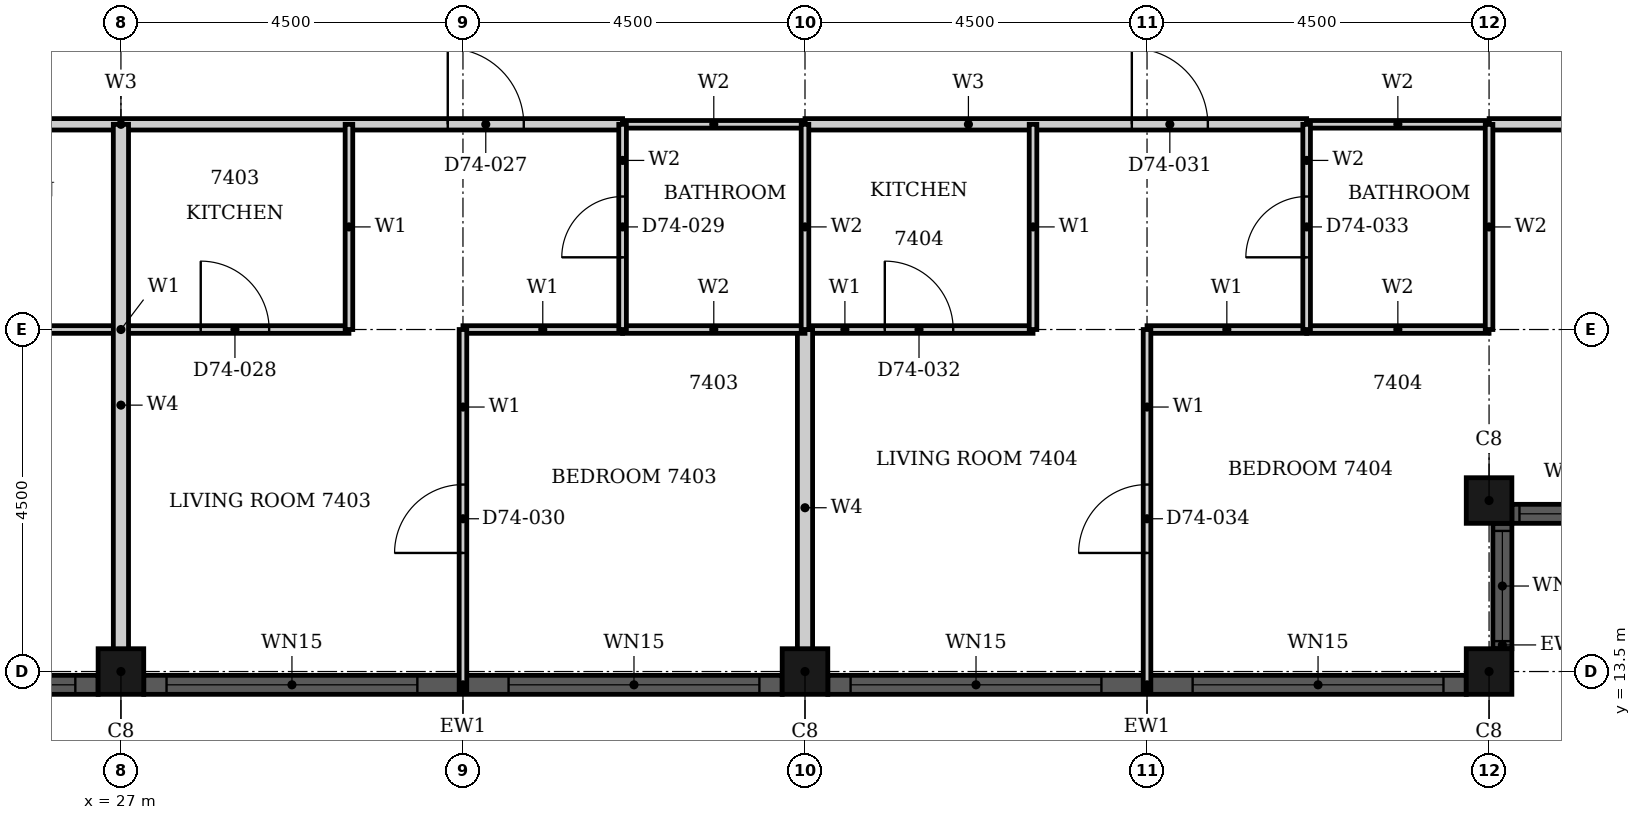
"""IFC4 building model, lengths in metres.
Left out: names, types, materials, properties, quantities, classifications, styles, units other than length and angle.
Written with IfcOpenShell. Run it as: python <this file> out.ifc"""

import sys

from ifc_helpers import new_model, si_unit, direction, frame, frame_2d, origin, origin_2d, place, context, subcontext, project, spatial, rectangle, hollow_rectangle, extrude, element, fill, save


model = new_model("IFC4")
c1 = context("Model", 3, precision=1e-05, world=origin(), true_north=direction((0.0, 1.0)))
c2 = subcontext(c1, "Body", "Model", "MODEL_VIEW")
j1 = project(units=[si_unit("LENGTHUNIT", "METRE"), si_unit("PLANEANGLEUNIT", "RADIAN")], contexts=[c1])
p1 = place(None, origin())
s1 = spatial("IfcSite", under=j1, at=p1, CompositionType="ELEMENT")
p2 = place(p1, origin())
s2 = spatial("IfcBuilding", under=s1, at=p2, CompositionType="ELEMENT")
p3 = place(p2, frame((0.0, 0.0, 290.8)))
s3 = spatial("IfcBuildingStorey", under=s2, at=p3, CompositionType="ELEMENT", Elevation=290.8)
for number, where, z_axis, x_axis in (
    (1, (45.0, 13.5, 0.0), (0.0, 0.0, 1.0), (1.0, 0.0, 0.0)),
    (2, (45.0, 15.75, 0.0), (0.0, 0.0, 1.0), (1.0, 0.0, 0.0)),
    (3, (27.0, 13.5, 0.0), (0.0, 0.0, 1.0), (1.0, 0.0, 0.0)),
    (4, (36.0, 13.5, 0.0), (0.0, 0.0, 1.0), (1.0, 0.0, 0.0)),
):
    element("IfcColumn", number, at=place(p3, frame(where, z_axis=z_axis, x_axis=x_axis)), inside=s3, PredefinedType="COLUMN", context=c2, shape_type="SweptSolid", body=[
        extrude(hollow_rectangle(XDim=0.6, YDim=0.6, WallThickness=0.02, at=origin_2d()), origin(), (0.0, 0.0, 1.0), 3.7),
    ])
p4 = place(p3, frame((45.175, 13.8, 0.0), z_axis=(0.0, 0.0, 1.0), x_axis=(0.0, 1.0, 0.0)))
e5 = element("IfcWall", 5, at=p4, inside=s3, PredefinedType="SOLIDWALL", context=c2, shape_type="SweptSolid", body=[
    extrude(rectangle(XDim=1.65, YDim=0.25, at=frame_2d((0.825, 0.0))), origin(), (0.0, 0.0, 1.0), 3.7),
])
p5 = place(p4, frame((0.1, 0.0, 0.9)))
e6 = element("IfcOpeningElement", 6, at=p5, cuts=e5, PredefinedType="OPENING", context=c2, shape_type="SweptSolid", body=[
    extrude(rectangle(XDim=1.45, YDim=1.85, at=frame_2d((0.725, 0.925))), frame((0.0, 0.135, 0.0), z_axis=(0.0, -1.0, 0.0), x_axis=(1.0, 0.0, 0.0)), (0.0, 0.0, 1.0), 0.27),
])
p6 = place(p3, frame((45.3, 15.575, 0.0), z_axis=(0.0, 0.0, 1.0), x_axis=(1.0, 0.0, 0.0)))
e7 = element("IfcWall", 7, at=p6, inside=s3, PredefinedType="SOLIDWALL", context=c2, shape_type="SweptSolid", body=[
    extrude(rectangle(XDim=1.65, YDim=0.25, at=frame_2d((0.825, 0.0))), origin(), (0.0, 0.0, 1.0), 3.7),
])
p7 = place(p6, frame((0.1, 0.0, 0.9)))
e8 = element("IfcOpeningElement", 8, at=p7, cuts=e7, PredefinedType="OPENING", context=c2, shape_type="SweptSolid", body=[
    extrude(rectangle(XDim=1.45, YDim=1.85, at=frame_2d((0.725, 0.925))), frame((0.0, 0.135, 0.0), z_axis=(0.0, -1.0, 0.0), x_axis=(1.0, 0.0, 0.0)), (0.0, 0.0, 1.0), 0.27),
])
p8 = place(p3, frame((18.3, 13.325, 0.0), z_axis=(0.0, 0.0, 1.0), x_axis=(1.0, 0.0, 0.0)))
e9 = element("IfcWall", 9, at=p8, inside=s3, PredefinedType="SOLIDWALL", context=c2, shape_type="SweptSolid", body=[
    extrude(rectangle(XDim=8.4, YDim=0.25, at=frame_2d((4.2, 0.0))), origin(), (0.0, 0.0, 1.0), 3.7),
])
p9 = place(p8, frame((0.3, 0.0, 0.45)))
e10 = element("IfcOpeningElement", 10, at=p9, cuts=e9, PredefinedType="OPENING", context=c2, shape_type="SweptSolid", body=[
    extrude(rectangle(XDim=3.3, YDim=2.3, at=frame_2d((1.65, 1.15))), frame((0.0, 0.135, 0.0), z_axis=(0.0, -1.0, 0.0), x_axis=(1.0, 0.0, 0.0)), (0.0, 0.0, 1.0), 0.27),
])
p10 = place(p8, frame((4.8, 0.0, 0.45)))
e11 = element("IfcOpeningElement", 11, at=p10, cuts=e9, PredefinedType="OPENING", context=c2, shape_type="SweptSolid", body=[
    extrude(rectangle(XDim=3.3, YDim=2.3, at=frame_2d((1.65, 1.15))), frame((0.0, 0.135, 0.0), z_axis=(0.0, -1.0, 0.0), x_axis=(1.0, 0.0, 0.0)), (0.0, 0.0, 1.0), 0.27),
])
p11 = place(p3, frame((27.3, 13.325, 0.0), z_axis=(0.0, 0.0, 1.0), x_axis=(1.0, 0.0, 0.0)))
e12 = element("IfcWall", 12, at=p11, inside=s3, PredefinedType="SOLIDWALL", context=c2, shape_type="SweptSolid", body=[
    extrude(rectangle(XDim=8.4, YDim=0.25, at=frame_2d((4.2, 0.0))), origin(), (0.0, 0.0, 1.0), 3.7),
])
p12 = place(p11, frame((0.3, 0.0, 0.45)))
e13 = element("IfcOpeningElement", 13, at=p12, cuts=e12, PredefinedType="OPENING", context=c2, shape_type="SweptSolid", body=[
    extrude(rectangle(XDim=3.3, YDim=2.3, at=frame_2d((1.65, 1.15))), frame((0.0, 0.135, 0.0), z_axis=(0.0, -1.0, 0.0), x_axis=(1.0, 0.0, 0.0)), (0.0, 0.0, 1.0), 0.27),
])
p13 = place(p11, frame((4.8, 0.0, 0.45)))
e14 = element("IfcOpeningElement", 14, at=p13, cuts=e12, PredefinedType="OPENING", context=c2, shape_type="SweptSolid", body=[
    extrude(rectangle(XDim=3.3, YDim=2.3, at=frame_2d((1.65, 1.15))), frame((0.0, 0.135, 0.0), z_axis=(0.0, -1.0, 0.0), x_axis=(1.0, 0.0, 0.0)), (0.0, 0.0, 1.0), 0.27),
])
p14 = place(p3, frame((36.3, 13.325, 0.0), z_axis=(0.0, 0.0, 1.0), x_axis=(1.0, 0.0, 0.0)))
e15 = element("IfcWall", 15, at=p14, inside=s3, PredefinedType="SOLIDWALL", context=c2, shape_type="SweptSolid", body=[
    extrude(rectangle(XDim=8.4, YDim=0.25, at=frame_2d((4.2, 0.0))), origin(), (0.0, 0.0, 1.0), 3.7),
])
p15 = place(p14, frame((0.3, 0.0, 0.45)))
e16 = element("IfcOpeningElement", 16, at=p15, cuts=e15, PredefinedType="OPENING", context=c2, shape_type="SweptSolid", body=[
    extrude(rectangle(XDim=3.3, YDim=2.3, at=frame_2d((1.65, 1.15))), frame((0.0, 0.135, 0.0), z_axis=(0.0, -1.0, 0.0), x_axis=(1.0, 0.0, 0.0)), (0.0, 0.0, 1.0), 0.27),
])
p16 = place(p14, frame((4.8, 0.0, 0.45)))
e17 = element("IfcOpeningElement", 17, at=p16, cuts=e15, PredefinedType="OPENING", context=c2, shape_type="SweptSolid", body=[
    extrude(rectangle(XDim=3.3, YDim=2.3, at=frame_2d((1.65, 1.15))), frame((0.0, 0.135, 0.0), z_axis=(0.0, -1.0, 0.0), x_axis=(1.0, 0.0, 0.0)), (0.0, 0.0, 1.0), 0.27),
])
p17 = place(p3, frame((20.4, 20.7, 0.0), z_axis=(0.0, 0.0, 1.0), x_axis=(1.0, 0.0, 0.0)))
e18 = element("IfcWall", 18, at=p17, inside=s3, PredefinedType="PARTITIONING", context=c2, shape_type="SweptSolid", body=[
    extrude(rectangle(XDim=13.2, YDim=0.15, at=frame_2d((6.6, 0.0))), origin(), (0.0, 0.0, 1.0), 3.4),
])
p18 = place(p17, frame((1.3, 0.0, 0.0)))
e19 = element("IfcOpeningElement", 19, at=p18, cuts=e18, PredefinedType="OPENING", context=c2, shape_type="SweptSolid", body=[
    extrude(rectangle(XDim=1.0, YDim=2.2, at=frame_2d((0.5, 1.1))), frame((0.0, 0.085, 0.0), z_axis=(0.0, -1.0, 0.0), x_axis=(1.0, 0.0, 0.0)), (0.0, 0.0, 1.0), 0.17),
])
p19 = place(p17, frame((10.9, 0.0, 0.0)))
e20 = element("IfcOpeningElement", 20, at=p19, cuts=e18, PredefinedType="OPENING", context=c2, shape_type="SweptSolid", body=[
    extrude(rectangle(XDim=1.0, YDim=2.2, at=frame_2d((0.5, 1.1))), frame((0.0, 0.085, 0.0), z_axis=(0.0, -1.0, 0.0), x_axis=(1.0, 0.0, 0.0)), (0.0, 0.0, 1.0), 0.17),
])
p20 = place(p3, frame((45.001, 20.7, 0.0), z_axis=(0.0, 0.0, 1.0), x_axis=(1.0, 0.0, 0.0)))
e21 = element("IfcWall", 21, at=p20, inside=s3, PredefinedType="PARTITIONING", context=c2, shape_type="SweptSolid", body=[
    extrude(rectangle(XDim=4.549, YDim=0.15, at=frame_2d((2.274, 0.0))), origin(), (0.0, 0.0, 1.0), 3.4),
])
p21 = place(p3, frame((36.0, 20.7, 0.0), z_axis=(0.0, 0.0, 1.0), x_axis=(1.0, 0.0, 0.0)))
e22 = element("IfcWall", 22, at=p21, inside=s3, PredefinedType="PARTITIONING", context=c2, shape_type="SweptSolid", body=[
    extrude(rectangle(XDim=6.6, YDim=0.15, at=frame_2d((3.3, 0.0))), origin(), (0.0, 0.0, 1.0), 3.4),
])
p22 = place(p21, frame((4.3, 0.0, 0.0)))
e23 = element("IfcOpeningElement", 23, at=p22, cuts=e22, PredefinedType="OPENING", context=c2, shape_type="SweptSolid", body=[
    extrude(rectangle(XDim=1.0, YDim=2.2, at=frame_2d((0.5, 1.1))), frame((0.0, 0.085, 0.0), z_axis=(0.0, -1.0, 0.0), x_axis=(1.0, 0.0, 0.0)), (0.0, 0.0, 1.0), 0.17),
])
p23 = place(p3, frame((24.0, 18.0, 0.0), z_axis=(0.0, 0.0, 1.0), x_axis=(1.0, 0.0, 0.0)))
e24 = element("IfcWall", 24, at=p23, inside=s3, PredefinedType="PARTITIONING", context=c2, shape_type="SweptSolid", body=[
    extrude(rectangle(XDim=6.0, YDim=0.1, at=frame_2d((3.0, 0.0))), origin(), (0.0, 0.0, 1.0), 3.4),
])
p24 = place(p23, frame((1.05, 0.0, 0.0)))
e25 = element("IfcOpeningElement", 25, at=p24, cuts=e24, PredefinedType="OPENING", context=c2, shape_type="SweptSolid", body=[
    extrude(rectangle(XDim=0.9, YDim=2.1, at=frame_2d((0.45, 1.05))), frame((0.0, 0.06, 0.0), z_axis=(0.0, -1.0, 0.0), x_axis=(1.0, 0.0, 0.0)), (0.0, 0.0, 1.0), 0.12),
])
p25 = place(p23, frame((4.05, 0.0, 0.0)))
e26 = element("IfcOpeningElement", 26, at=p25, cuts=e24, PredefinedType="OPENING", context=c2, shape_type="SweptSolid", body=[
    extrude(rectangle(XDim=0.9, YDim=2.1, at=frame_2d((0.45, 1.05))), frame((0.0, 0.06, 0.0), z_axis=(0.0, -1.0, 0.0), x_axis=(1.0, 0.0, 0.0)), (0.0, 0.0, 1.0), 0.12),
])
for number, where, z_axis, x_axis in (
    (27, (31.5, 18.0, 0.0), (0.0, 0.0, 1.0), (1.0, 0.0, 0.0)),
    (28, (40.5, 18.0, 0.0), (0.0, 0.0, 1.0), (1.0, 0.0, 0.0)),
):
    element("IfcWall", number, at=place(p3, frame(where, z_axis=z_axis, x_axis=x_axis)), inside=s3, PredefinedType="PARTITIONING", context=c2, shape_type="SweptSolid", body=[
        extrude(rectangle(XDim=2.1, YDim=0.1, at=frame_2d((1.05, 0.0))), origin(), (0.0, 0.0, 1.0), 3.4),
    ])
p26 = place(p3, frame((36.0, 18.0, 0.0), z_axis=(0.0, 0.0, 1.0), x_axis=(1.0, 0.0, 0.0)))
e29 = element("IfcWall", 29, at=p26, inside=s3, PredefinedType="PARTITIONING", context=c2, shape_type="SweptSolid", body=[
    extrude(rectangle(XDim=3.0, YDim=0.1, at=frame_2d((1.5, 0.0))), origin(), (0.0, 0.0, 1.0), 3.4),
])
p27 = place(p26, frame((1.05, 0.0, 0.0)))
e30 = element("IfcOpeningElement", 30, at=p27, cuts=e29, PredefinedType="OPENING", context=c2, shape_type="SweptSolid", body=[
    extrude(rectangle(XDim=0.9, YDim=2.1, at=frame_2d((0.45, 1.05))), frame((0.0, 0.06, 0.0), z_axis=(0.0, -1.0, 0.0), x_axis=(1.0, 0.0, 0.0)), (0.0, 0.0, 1.0), 0.12),
])
p28 = place(p3, frame((30.0, 18.0, 0.0), z_axis=(0.0, 0.0, 1.0), x_axis=(0.0, 1.0, 0.0)))
e31 = element("IfcWall", 31, at=p28, inside=s3, PredefinedType="PARTITIONING", context=c2, shape_type="SweptSolid", body=[
    extrude(rectangle(XDim=2.7, YDim=0.1, at=frame_2d((1.35, 0.0))), origin(), (0.0, 0.0, 1.0), 3.4),
])
p29 = place(p3, frame((31.5, 13.26, 0.0), z_axis=(0.0, 0.0, 1.0), x_axis=(0.0, 1.0, 0.0)))
e32 = element("IfcWall", 32, at=p29, inside=s3, PredefinedType="PARTITIONING", context=c2, shape_type="SweptSolid", body=[
    extrude(rectangle(XDim=4.74, YDim=0.1, at=frame_2d((2.37, 0.0))), origin(), (0.0, 0.0, 1.0), 3.4),
])
p30 = place(p29, frame((1.8, 0.0, 0.0)))
e33 = element("IfcOpeningElement", 33, at=p30, cuts=e32, PredefinedType="OPENING", context=c2, shape_type="SweptSolid", body=[
    extrude(rectangle(XDim=0.9, YDim=2.1, at=frame_2d((0.45, 1.05))), frame((0.0, 0.06, 0.0), z_axis=(0.0, -1.0, 0.0), x_axis=(1.0, 0.0, 0.0)), (0.0, 0.0, 1.0), 0.12),
])
p31 = place(p3, frame((39.0, 18.0, 0.0), z_axis=(0.0, 0.0, 1.0), x_axis=(0.0, 1.0, 0.0)))
e34 = element("IfcWall", 34, at=p31, inside=s3, PredefinedType="PARTITIONING", context=c2, shape_type="SweptSolid", body=[
    extrude(rectangle(XDim=2.7, YDim=0.1, at=frame_2d((1.35, 0.0))), origin(), (0.0, 0.0, 1.0), 3.4),
])
p32 = place(p3, frame((40.5, 13.26, 0.0), z_axis=(0.0, 0.0, 1.0), x_axis=(0.0, 1.0, 0.0)))
e35 = element("IfcWall", 35, at=p32, inside=s3, PredefinedType="PARTITIONING", context=c2, shape_type="SweptSolid", body=[
    extrude(rectangle(XDim=4.74, YDim=0.1, at=frame_2d((2.37, 0.0))), origin(), (0.0, 0.0, 1.0), 3.4),
])
p33 = place(p32, frame((1.8, 0.0, 0.0)))
e36 = element("IfcOpeningElement", 36, at=p33, cuts=e35, PredefinedType="OPENING", context=c2, shape_type="SweptSolid", body=[
    extrude(rectangle(XDim=0.9, YDim=2.1, at=frame_2d((0.45, 1.05))), frame((0.0, 0.06, 0.0), z_axis=(0.0, -1.0, 0.0), x_axis=(1.0, 0.0, 0.0)), (0.0, 0.0, 1.0), 0.12),
])
p34 = place(p3, frame((27.0, 13.31, 0.0), z_axis=(0.0, 0.0, 1.0), x_axis=(0.0, 1.0, 0.0)))
e37 = element("IfcWall", 37, at=p34, inside=s3, PredefinedType="PARTITIONING", context=c2, shape_type="SweptSolid", body=[
    extrude(rectangle(XDim=7.39, YDim=0.2, at=frame_2d((3.695, 0.0))), origin(), (0.0, 0.0, 1.0), 3.4),
])
p35 = place(p3, frame((36.0, 13.31, 0.0), z_axis=(0.0, 0.0, 1.0), x_axis=(0.0, 1.0, 0.0)))
e38 = element("IfcWall", 38, at=p35, inside=s3, PredefinedType="PARTITIONING", context=c2, shape_type="SweptSolid", body=[
    extrude(rectangle(XDim=4.69, YDim=0.2, at=frame_2d((2.345, 0.0))), origin(), (0.0, 0.0, 1.0), 3.4),
])
for number, where, z_axis, x_axis in (
    (39, (33.6, 18.0, 0.0), (0.0, 0.0, 1.0), (1.0, 0.0, 0.0)),
    (40, (42.6, 18.0, 0.0), (0.0, 0.0, 1.0), (1.0, 0.0, 0.0)),
    (41, (33.6, 20.7, 0.0), (0.0, 0.0, 1.0), (1.0, 0.0, 0.0)),
    (42, (42.6, 20.7, 0.0), (0.0, 0.0, 1.0), (1.0, 0.0, 0.0)),
):
    element("IfcWall", number, at=place(p3, frame(where, z_axis=z_axis, x_axis=x_axis)), inside=s3, PredefinedType="PARTITIONING", context=c2, shape_type="SweptSolid", body=[
        extrude(rectangle(XDim=2.4, YDim=0.1, at=frame_2d((1.2, 0.0))), origin(), (0.0, 0.0, 1.0), 3.4),
    ])
p36 = place(p3, frame((33.6, 18.0, 0.0), z_axis=(0.0, 0.0, 1.0), x_axis=(0.0, 1.0, 0.0)))
e43 = element("IfcWall", 43, at=p36, inside=s3, PredefinedType="PARTITIONING", context=c2, shape_type="SweptSolid", body=[
    extrude(rectangle(XDim=2.7, YDim=0.1, at=frame_2d((1.35, 0.0))), origin(), (0.0, 0.0, 1.0), 3.4),
])
p37 = place(p36, frame((0.95, 0.0, 0.0)))
e44 = element("IfcOpeningElement", 44, at=p37, cuts=e43, PredefinedType="OPENING", context=c2, shape_type="SweptSolid", body=[
    extrude(rectangle(XDim=0.8, YDim=2.1, at=frame_2d((0.4, 1.05))), frame((0.0, 0.06, 0.0), z_axis=(0.0, -1.0, 0.0), x_axis=(1.0, 0.0, 0.0)), (0.0, 0.0, 1.0), 0.12),
])
p38 = place(p3, frame((36.0, 18.0, 0.0), z_axis=(0.0, 0.0, 1.0), x_axis=(0.0, 1.0, 0.0)))
e45 = element("IfcWall", 45, at=p38, inside=s3, PredefinedType="PARTITIONING", context=c2, shape_type="SweptSolid", body=[
    extrude(rectangle(XDim=2.7, YDim=0.1, at=frame_2d((1.35, 0.0))), origin(), (0.0, 0.0, 1.0), 3.4),
])
p39 = place(p3, frame((42.6, 18.0, 0.0), z_axis=(0.0, 0.0, 1.0), x_axis=(0.0, 1.0, 0.0)))
e46 = element("IfcWall", 46, at=p39, inside=s3, PredefinedType="PARTITIONING", context=c2, shape_type="SweptSolid", body=[
    extrude(rectangle(XDim=2.7, YDim=0.1, at=frame_2d((1.35, 0.0))), origin(), (0.0, 0.0, 1.0), 3.4),
])
p40 = place(p39, frame((0.95, 0.0, 0.0)))
e47 = element("IfcOpeningElement", 47, at=p40, cuts=e46, PredefinedType="OPENING", context=c2, shape_type="SweptSolid", body=[
    extrude(rectangle(XDim=0.8, YDim=2.1, at=frame_2d((0.4, 1.05))), frame((0.0, 0.06, 0.0), z_axis=(0.0, -1.0, 0.0), x_axis=(1.0, 0.0, 0.0)), (0.0, 0.0, 1.0), 0.12),
])
p41 = place(p3, frame((45.0, 18.0, 0.0), z_axis=(0.0, 0.0, 1.0), x_axis=(0.0, 1.0, 0.0)))
e48 = element("IfcWall", 48, at=p41, inside=s3, PredefinedType="PARTITIONING", context=c2, shape_type="SweptSolid", body=[
    extrude(rectangle(XDim=2.699, YDim=0.1, at=frame_2d((1.35, 0.0))), origin(), (0.0, 0.0, 1.0), 3.4),
])
p42 = place(p5, origin())
e49 = element("IfcWindow", 49, at=p42, inside=s3, PartitioningType="SINGLE_PANEL", PredefinedType="WINDOW", context=c2, shape_type="SweptSolid", body=[
    extrude(rectangle(XDim=1.45, YDim=1.85, at=frame_2d((0.725, 0.925))), frame((0.0, 0.03, 0.0), z_axis=(0.0, -1.0, 0.0), x_axis=(1.0, 0.0, 0.0)), (0.0, 0.0, 1.0), 0.06),
])
fill(e6, e49)
p43 = place(p7, origin())
e50 = element("IfcWindow", 50, at=p43, inside=s3, PartitioningType="SINGLE_PANEL", PredefinedType="WINDOW", context=c2, shape_type="SweptSolid", body=[
    extrude(rectangle(XDim=1.45, YDim=1.85, at=frame_2d((0.725, 0.925))), frame((0.0, 0.03, 0.0), z_axis=(0.0, -1.0, 0.0), x_axis=(1.0, 0.0, 0.0)), (0.0, 0.0, 1.0), 0.06),
])
fill(e8, e50)
p44 = place(p10, origin())
e51 = element("IfcWindow", 51, at=p44, inside=s3, PartitioningType="SINGLE_PANEL", PredefinedType="WINDOW", context=c2, shape_type="SweptSolid", body=[
    extrude(rectangle(XDim=3.3, YDim=2.3, at=frame_2d((1.65, 1.15))), frame((0.0, 0.03, 0.0), z_axis=(0.0, -1.0, 0.0), x_axis=(1.0, 0.0, 0.0)), (0.0, 0.0, 1.0), 0.06),
])
fill(e11, e51)
p45 = place(p12, origin())
e52 = element("IfcWindow", 52, at=p45, inside=s3, PartitioningType="SINGLE_PANEL", PredefinedType="WINDOW", context=c2, shape_type="SweptSolid", body=[
    extrude(rectangle(XDim=3.3, YDim=2.3, at=frame_2d((1.65, 1.15))), frame((0.0, 0.03, 0.0), z_axis=(0.0, -1.0, 0.0), x_axis=(1.0, 0.0, 0.0)), (0.0, 0.0, 1.0), 0.06),
])
fill(e13, e52)
p46 = place(p13, origin())
e53 = element("IfcWindow", 53, at=p46, inside=s3, PartitioningType="SINGLE_PANEL", PredefinedType="WINDOW", context=c2, shape_type="SweptSolid", body=[
    extrude(rectangle(XDim=3.3, YDim=2.3, at=frame_2d((1.65, 1.15))), frame((0.0, 0.03, 0.0), z_axis=(0.0, -1.0, 0.0), x_axis=(1.0, 0.0, 0.0)), (0.0, 0.0, 1.0), 0.06),
])
fill(e14, e53)
p47 = place(p15, origin())
e54 = element("IfcWindow", 54, at=p47, inside=s3, PartitioningType="SINGLE_PANEL", PredefinedType="WINDOW", context=c2, shape_type="SweptSolid", body=[
    extrude(rectangle(XDim=3.3, YDim=2.3, at=frame_2d((1.65, 1.15))), frame((0.0, 0.03, 0.0), z_axis=(0.0, -1.0, 0.0), x_axis=(1.0, 0.0, 0.0)), (0.0, 0.0, 1.0), 0.06),
])
fill(e16, e54)
p48 = place(p16, origin())
e55 = element("IfcWindow", 55, at=p48, inside=s3, PartitioningType="SINGLE_PANEL", PredefinedType="WINDOW", context=c2, shape_type="SweptSolid", body=[
    extrude(rectangle(XDim=3.3, YDim=2.3, at=frame_2d((1.65, 1.15))), frame((0.0, 0.03, 0.0), z_axis=(0.0, -1.0, 0.0), x_axis=(1.0, 0.0, 0.0)), (0.0, 0.0, 1.0), 0.06),
])
fill(e17, e55)
p49 = place(p19, origin())
e56 = element("IfcDoor", 56, at=p49, inside=s3, OperationType="SINGLE_SWING_LEFT", PredefinedType="DOOR", context=c2, shape_type="SweptSolid", body=[
    extrude(rectangle(XDim=1.0, YDim=2.2, at=frame_2d((0.5, 1.1))), frame((0.0, 0.025, 0.0), z_axis=(0.0, -1.0, 0.0), x_axis=(1.0, 0.0, 0.0)), (0.0, 0.0, 1.0), 0.05),
])
fill(e20, e56)
p50 = place(p25, origin())
e57 = element("IfcDoor", 57, at=p50, inside=s3, OperationType="SINGLE_SWING_LEFT", PredefinedType="DOOR", context=c2, shape_type="SweptSolid", body=[
    extrude(rectangle(XDim=0.9, YDim=2.1, at=frame_2d((0.45, 1.05))), frame((0.0, 0.025, 0.0), z_axis=(0.0, -1.0, 0.0), x_axis=(1.0, 0.0, 0.0)), (0.0, 0.0, 1.0), 0.05),
])
fill(e26, e57)
p51 = place(p37, origin())
e58 = element("IfcDoor", 58, at=p51, inside=s3, OperationType="SINGLE_SWING_LEFT", PredefinedType="DOOR", context=c2, shape_type="SweptSolid", body=[
    extrude(rectangle(XDim=0.8, YDim=2.1, at=frame_2d((0.4, 1.05))), frame((0.0, 0.025, 0.0), z_axis=(0.0, -1.0, 0.0), x_axis=(1.0, 0.0, 0.0)), (0.0, 0.0, 1.0), 0.05),
])
fill(e44, e58)
p52 = place(p30, origin())
e59 = element("IfcDoor", 59, at=p52, inside=s3, OperationType="SINGLE_SWING_RIGHT", PredefinedType="DOOR", context=c2, shape_type="SweptSolid", body=[
    extrude(rectangle(XDim=0.9, YDim=2.1, at=frame_2d((0.45, 1.05))), frame((0.0, 0.025, 0.0), z_axis=(0.0, -1.0, 0.0), x_axis=(1.0, 0.0, 0.0)), (0.0, 0.0, 1.0), 0.05),
])
fill(e33, e59)
p53 = place(p22, origin())
e60 = element("IfcDoor", 60, at=p53, inside=s3, OperationType="SINGLE_SWING_RIGHT", PredefinedType="DOOR", context=c2, shape_type="SweptSolid", body=[
    extrude(rectangle(XDim=1.0, YDim=2.2, at=frame_2d((0.5, 1.1))), frame((0.0, 0.025, 0.0), z_axis=(0.0, -1.0, 0.0), x_axis=(1.0, 0.0, 0.0)), (0.0, 0.0, 1.0), 0.05),
])
fill(e23, e60)
p54 = place(p27, origin())
e61 = element("IfcDoor", 61, at=p54, inside=s3, OperationType="SINGLE_SWING_RIGHT", PredefinedType="DOOR", context=c2, shape_type="SweptSolid", body=[
    extrude(rectangle(XDim=0.9, YDim=2.1, at=frame_2d((0.45, 1.05))), frame((0.0, 0.025, 0.0), z_axis=(0.0, -1.0, 0.0), x_axis=(1.0, 0.0, 0.0)), (0.0, 0.0, 1.0), 0.05),
])
fill(e30, e61)
p55 = place(p40, origin())
e62 = element("IfcDoor", 62, at=p55, inside=s3, OperationType="SINGLE_SWING_RIGHT", PredefinedType="DOOR", context=c2, shape_type="SweptSolid", body=[
    extrude(rectangle(XDim=0.8, YDim=2.1, at=frame_2d((0.4, 1.05))), frame((0.0, 0.025, 0.0), z_axis=(0.0, -1.0, 0.0), x_axis=(1.0, 0.0, 0.0)), (0.0, 0.0, 1.0), 0.05),
])
fill(e47, e62)
p56 = place(p33, origin())
e63 = element("IfcDoor", 63, at=p56, inside=s3, OperationType="SINGLE_SWING_LEFT", PredefinedType="DOOR", context=c2, shape_type="SweptSolid", body=[
    extrude(rectangle(XDim=0.9, YDim=2.1, at=frame_2d((0.45, 1.05))), frame((0.0, 0.025, 0.0), z_axis=(0.0, -1.0, 0.0), x_axis=(1.0, 0.0, 0.0)), (0.0, 0.0, 1.0), 0.05),
])
fill(e36, e63)
save(model, sys.argv[1])
